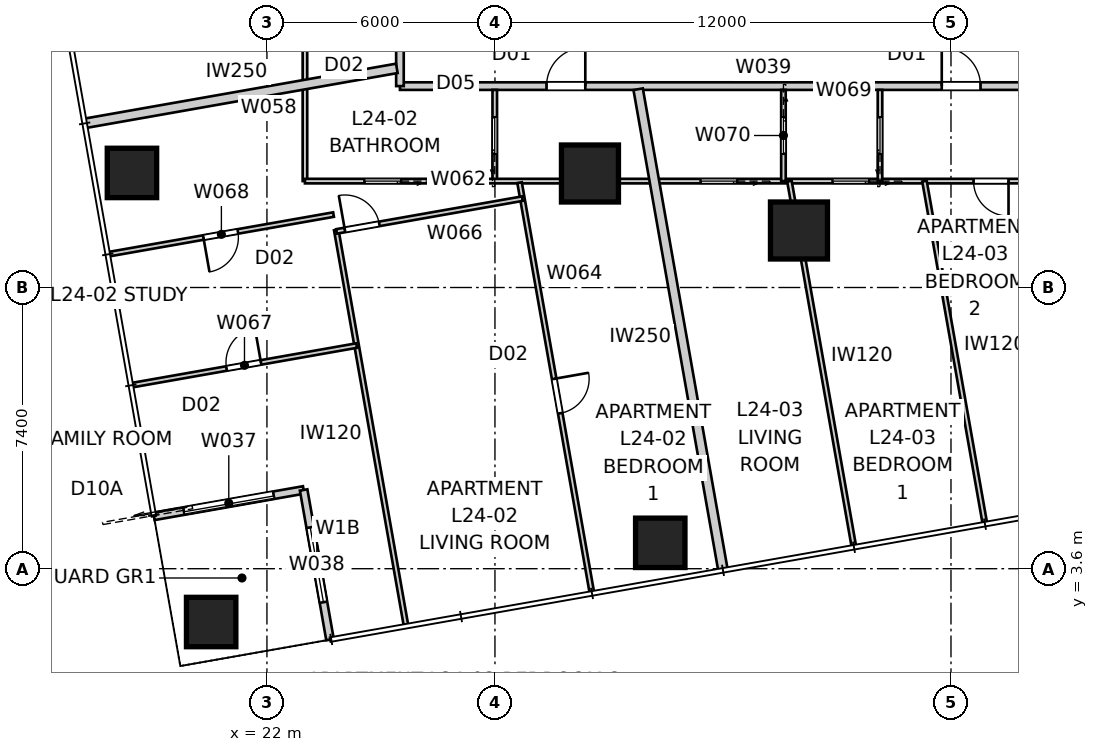
"""IFC4 building model, lengths in metres.
Left out: names, types, materials, properties, quantities, classifications, styles, units other than length and angle.
Written with IfcOpenShell. Run it as: python <this file> out.ifc"""

import sys

from ifc_helpers import new_model, si_unit, direction, frame, frame_2d, origin, origin_2d, place, context, subcontext, project, spatial, rectangle, extrude, element, fill, save


model = new_model("IFC4")
c1 = context("Model", 3, precision=1e-05, world=origin(), true_north=direction((0.0, 1.0)))
c2 = subcontext(c1, "Body", "Model", "MODEL_VIEW")
j1 = project(units=[si_unit("LENGTHUNIT", "METRE"), si_unit("PLANEANGLEUNIT", "RADIAN")], contexts=[c1])
p1 = place(None, origin())
s1 = spatial("IfcSite", under=j1, at=p1, CompositionType="ELEMENT")
p2 = place(p1, origin())
s2 = spatial("IfcBuilding", under=s1, at=p2, CompositionType="ELEMENT")
p3 = place(p2, frame((0.0, 0.0, 89.6)))
s3 = spatial("IfcBuildingStorey", under=s2, at=p3, CompositionType="ELEMENT", Elevation=89.6)
for number, where, z_axis, x_axis in (
    (1, (20.532, 2.197, 0.0), (0.0, 0.0, 1.0), (1.0, 0.0, 0.0)),
    (2, (32.35, 4.281, 0.0), (0.0, 0.0, 1.0), (1.0, 0.0, 0.0)),
    (3, (18.448, 14.015, 0.0), (0.0, 0.0, 1.0), (1.0, 0.0, 0.0)),
):
    element("IfcColumn", number, at=place(p3, frame(where, z_axis=z_axis, x_axis=x_axis)), inside=s3, PredefinedType="COLUMN", context=c2, shape_type="SweptSolid", body=[
        extrude(rectangle(XDim=1.3, YDim=1.3, at=origin_2d()), origin(), (0.0, 0.0, 1.0), 3.4),
    ])
for number, where, z_axis, x_axis in (
    (4, (30.5, 14.0, 0.0), (0.0, 0.0, 1.0), (1.0, 0.0, 0.0)),
    (5, (36.0, 12.5, 0.0), (0.0, 0.0, 1.0), (1.0, 0.0, 0.0)),
):
    element("IfcColumn", number, at=place(p3, frame(where, z_axis=z_axis, x_axis=x_axis)), inside=s3, PredefinedType="COLUMN", context=c2, shape_type="SweptSolid", body=[
        extrude(rectangle(XDim=1.5, YDim=1.5, at=origin_2d()), origin(), (0.0, 0.0, 1.0), 3.4),
    ])
p4 = place(p3, frame((19.026, 4.978, 0.0), z_axis=(0.0, 0.0, 1.0), x_axis=(0.984808127031, 0.173646056486, 0.0)))
e6 = element("IfcWall", 6, at=p4, inside=s3, PredefinedType="SOLIDWALL", context=c2, shape_type="SweptSolid", body=[
    extrude(rectangle(XDim=4.0, YDim=0.2, at=frame_2d((2.0, 0.0))), origin(), (0.0, 0.0, 1.0), 3.25),
])
p5 = place(p4, frame((0.8, 0.0, 0.0)))
e7 = element("IfcOpeningElement", 7, at=p5, cuts=e6, PredefinedType="OPENING", context=c2, shape_type="SweptSolid", body=[
    extrude(rectangle(XDim=2.4, YDim=2.1, at=frame_2d((1.2, 1.05))), frame((0.0, 0.11, 0.0), z_axis=(0.0, -1.0, 0.0), x_axis=(1.0, 0.0, 0.0)), (0.0, 0.0, 1.0), 0.22),
])
p6 = place(p3, frame((22.966, 5.672, 0.0), z_axis=(0.0, 0.0, 1.0), x_axis=(0.173646056486, -0.984808127031, 0.0)))
e8 = element("IfcWall", 8, at=p6, inside=s3, PredefinedType="SOLIDWALL", context=c2, shape_type="SweptSolid", body=[
    extrude(rectangle(XDim=4.0, YDim=0.2, at=frame_2d((2.0, 0.0))), origin(), (0.0, 0.0, 1.0), 3.25),
])
p7 = place(p6, frame((1.0, 0.0, 0.45)))
e9 = element("IfcOpeningElement", 9, at=p7, cuts=e8, PredefinedType="OPENING", context=c2, shape_type="SweptSolid", body=[
    extrude(rectangle(XDim=2.0, YDim=1.8, at=frame_2d((1.0, 0.9))), frame((0.0, 0.11, 0.0), z_axis=(0.0, -1.0, 0.0), x_axis=(1.0, 0.0, 0.0)), (0.0, 0.0, 1.0), 0.22),
])
p8 = place(p3, frame((25.5, 16.3, 0.0), z_axis=(0.0, 0.0, 1.0), x_axis=(1.0, 0.0, 0.0)))
e10 = element("IfcWall", 10, at=p8, inside=s3, PredefinedType="PARTITIONING", context=c2, shape_type="SweptSolid", body=[
    extrude(rectangle(XDim=29.0, YDim=0.2, at=frame_2d((14.5, 0.0))), origin(), (0.0, 0.0, 1.0), 3.25),
])
p9 = place(p8, frame((20.896, 0.0, 0.0)))
e11 = element("IfcOpeningElement", 11, at=p9, cuts=e10, PredefinedType="OPENING", context=c2, shape_type="SweptSolid", body=[
    extrude(rectangle(XDim=1.02, YDim=2.34, at=frame_2d((0.51, 1.17))), frame((0.0, 0.11, 0.0), z_axis=(0.0, -1.0, 0.0), x_axis=(1.0, 0.0, 0.0)), (0.0, 0.0, 1.0), 0.22),
])
p10 = place(p8, frame((14.257, 0.0, 0.0)))
e12 = element("IfcOpeningElement", 12, at=p10, cuts=e10, PredefinedType="OPENING", context=c2, shape_type="SweptSolid", body=[
    extrude(rectangle(XDim=1.02, YDim=2.34, at=frame_2d((0.51, 1.17))), frame((0.0, 0.11, 0.0), z_axis=(0.0, -1.0, 0.0), x_axis=(1.0, 0.0, 0.0)), (0.0, 0.0, 1.0), 0.22),
])
p11 = place(p8, frame((3.857, 0.0, 0.0)))
e13 = element("IfcOpeningElement", 13, at=p11, cuts=e10, PredefinedType="OPENING", context=c2, shape_type="SweptSolid", body=[
    extrude(rectangle(XDim=1.02, YDim=2.34, at=frame_2d((0.51, 1.17))), frame((0.0, 0.11, 0.0), z_axis=(0.0, -1.0, 0.0), x_axis=(1.0, 0.0, 0.0)), (0.0, 0.0, 1.0), 0.22),
])
p12 = place(p3, frame((25.5, 43.7, 0.0), z_axis=(0.0, 0.0, 1.0), x_axis=(0.0, -1.0, 0.0)))
e14 = element("IfcWall", 14, at=p12, inside=s3, PredefinedType="PARTITIONING", context=c2, shape_type="SweptSolid", body=[
    extrude(rectangle(XDim=27.4, YDim=0.2, at=frame_2d((13.7, 0.0))), origin(), (0.0, 0.0, 1.0), 3.25),
])
p13 = place(p12, frame((24.333, 0.0, 0.0)))
e15 = element("IfcOpeningElement", 15, at=p13, cuts=e14, PredefinedType="OPENING", context=c2, shape_type="SweptSolid", body=[
    extrude(rectangle(XDim=1.02, YDim=2.1, at=frame_2d((0.51, 1.05))), frame((0.0, 0.11, 0.0), z_axis=(0.0, -1.0, 0.0), x_axis=(1.0, 0.0, 0.0)), (0.0, 0.0, 1.0), 0.22),
])
p14 = place(p12, frame((10.631, 0.0, 0.0)))
e16 = element("IfcOpeningElement", 16, at=p14, cuts=e14, PredefinedType="OPENING", context=c2, shape_type="SweptSolid", body=[
    extrude(rectangle(XDim=1.02, YDim=2.34, at=frame_2d((0.51, 1.17))), frame((0.0, 0.11, 0.0), z_axis=(0.0, -1.0, 0.0), x_axis=(1.0, 0.0, 0.0)), (0.0, 0.0, 1.0), 0.22),
])
p15 = place(p12, frame((0.911, 0.0, 0.0)))
e17 = element("IfcOpeningElement", 17, at=p15, cuts=e14, PredefinedType="OPENING", context=c2, shape_type="SweptSolid", body=[
    extrude(rectangle(XDim=1.02, YDim=2.34, at=frame_2d((0.51, 1.17))), frame((0.0, 0.11, 0.0), z_axis=(0.0, -1.0, 0.0), x_axis=(1.0, 0.0, 0.0)), (0.0, 0.0, 1.0), 0.22),
])
p16 = place(p3, frame((34.001, 3.556, 0.0), z_axis=(0.0, 0.0, 1.0), x_axis=(-0.173639088111, 0.984809355703, 0.0)))
e18 = element("IfcWall", 18, at=p16, inside=s3, PredefinedType="PARTITIONING", context=c2, shape_type="SweptSolid", body=[
    extrude(rectangle(XDim=12.857, YDim=0.25, at=frame_2d((6.428, 0.0))), origin(), (0.0, 0.0, 1.0), 3.25),
])
p17 = place(p3, frame((17.203, 15.318, 0.0), z_axis=(0.0, 0.0, 1.0), x_axis=(0.984807121942, 0.173651756605, 0.0)))
e19 = element("IfcWall", 19, at=p17, inside=s3, PredefinedType="PARTITIONING", context=c2, shape_type="SweptSolid", body=[
    extrude(rectangle(XDim=8.341, YDim=0.25, at=frame_2d((4.171, 0.0))), origin(), (0.0, 0.0, 1.0), 3.25),
])
p18 = place(p3, frame((23.0, 13.8, 0.0), z_axis=(0.0, 0.0, 1.0), x_axis=(0.0, 1.0, 0.0)))
e20 = element("IfcWall", 20, at=p18, inside=s3, PredefinedType="PARTITIONING", context=c2, shape_type="SweptSolid", body=[
    extrude(rectangle(XDim=6.094, YDim=0.12, at=frame_2d((3.047, 0.0))), origin(), (0.0, 0.0, 1.0), 3.25),
])
p19 = place(p18, frame((3.857, 0.0, 0.0)))
e21 = element("IfcOpeningElement", 21, at=p19, cuts=e20, PredefinedType="OPENING", context=c2, shape_type="SweptSolid", body=[
    extrude(rectangle(XDim=0.92, YDim=2.34, at=frame_2d((0.46, 1.17))), frame((0.0, 0.07, 0.0), z_axis=(0.0, -1.0, 0.0), x_axis=(1.0, 0.0, 0.0)), (0.0, 0.0, 1.0), 0.14),
])
p20 = place(p3, frame((27.995, 13.8, 0.0), z_axis=(0.0, 0.0, 1.0), x_axis=(0.0, 1.0, 0.0)))
e22 = element("IfcWall", 22, at=p20, inside=s3, PredefinedType="PARTITIONING", context=c2, shape_type="SweptSolid", body=[
    extrude(rectangle(XDim=2.4, YDim=0.12, at=frame_2d((1.2, 0.0))), origin(), (0.0, 0.0, 1.0), 3.25),
])
p21 = place(p20, frame((0.72, 0.0, 0.0)))
e23 = element("IfcOpeningElement", 23, at=p21, cuts=e22, PredefinedType="OPENING", context=c2, shape_type="SweptSolid", body=[
    extrude(rectangle(XDim=0.96, YDim=2.1, at=frame_2d((0.48, 1.05))), frame((0.0, 0.07, 0.0), z_axis=(0.0, -1.0, 0.0), x_axis=(1.0, 0.0, 0.0)), (0.0, 0.0, 1.0), 0.14),
])
p22 = place(p3, frame((57.0, 13.8, 0.0), z_axis=(0.0, 0.0, 1.0), x_axis=(-1.0, 0.0, 0.0)))
e24 = element("IfcWall", 24, at=p22, inside=s3, PredefinedType="PARTITIONING", context=c2, shape_type="SweptSolid", body=[
    extrude(rectangle(XDim=34.0, YDim=0.12, at=frame_2d((17.0, 0.0))), origin(), (0.0, 0.0, 1.0), 2.55),
])
p23 = place(p22, frame((8.768, 0.0, 0.0)))
e25 = element("IfcOpeningElement", 25, at=p23, cuts=e24, PredefinedType="OPENING", context=c2, shape_type="SweptSolid", body=[
    extrude(rectangle(XDim=0.92, YDim=2.34, at=frame_2d((0.46, 1.17))), frame((0.0, 0.07, 0.0), z_axis=(0.0, -1.0, 0.0), x_axis=(1.0, 0.0, 0.0)), (0.0, 0.0, 1.0), 0.14),
])
p24 = place(p22, frame((10.995, 0.0, 0.0)))
e26 = element("IfcOpeningElement", 26, at=p24, cuts=e24, PredefinedType="OPENING", context=c2, shape_type="SweptSolid", body=[
    extrude(rectangle(XDim=0.92, YDim=2.34, at=frame_2d((0.46, 1.17))), frame((0.0, 0.07, 0.0), z_axis=(0.0, -1.0, 0.0), x_axis=(1.0, 0.0, 0.0)), (0.0, 0.0, 1.0), 0.14),
])
p25 = place(p22, frame((15.486, 0.0, 0.0)))
e27 = element("IfcOpeningElement", 27, at=p25, cuts=e24, PredefinedType="OPENING", context=c2, shape_type="SweptSolid", body=[
    extrude(rectangle(XDim=0.92, YDim=2.34, at=frame_2d((0.46, 1.17))), frame((0.0, 0.07, 0.0), z_axis=(0.0, -1.0, 0.0), x_axis=(1.0, 0.0, 0.0)), (0.0, 0.0, 1.0), 0.14),
])
p26 = place(p22, frame((4.804, 0.0, 0.0)))
e28 = element("IfcOpeningElement", 28, at=p26, cuts=e24, PredefinedType="OPENING", context=c2, shape_type="SweptSolid", body=[
    extrude(rectangle(XDim=0.96, YDim=2.1, at=frame_2d((0.48, 1.05))), frame((0.0, 0.07, 0.0), z_axis=(0.0, -1.0, 0.0), x_axis=(1.0, 0.0, 0.0)), (0.0, 0.0, 1.0), 0.14),
])
p27 = place(p22, frame((19.155, 0.0, 0.0)))
e29 = element("IfcOpeningElement", 29, at=p27, cuts=e24, PredefinedType="OPENING", context=c2, shape_type="SweptSolid", body=[
    extrude(rectangle(XDim=0.96, YDim=2.1, at=frame_2d((0.48, 1.05))), frame((0.0, 0.07, 0.0), z_axis=(0.0, -1.0, 0.0), x_axis=(1.0, 0.0, 0.0)), (0.0, 0.0, 1.0), 0.14),
])
p28 = place(p22, frame((31.473, 0.0, 0.0)))
e30 = element("IfcOpeningElement", 30, at=p28, cuts=e24, PredefinedType="OPENING", context=c2, shape_type="SweptSolid", body=[
    extrude(rectangle(XDim=0.96, YDim=2.1, at=frame_2d((0.48, 1.05))), frame((0.0, 0.07, 0.0), z_axis=(0.0, -1.0, 0.0), x_axis=(1.0, 0.0, 0.0)), (0.0, 0.0, 1.0), 0.14),
])
p29 = place(p22, frame((1.261, 0.0, 0.0)))
e31 = element("IfcOpeningElement", 31, at=p29, cuts=e24, PredefinedType="OPENING", context=c2, shape_type="SweptSolid", body=[
    extrude(rectangle(XDim=0.96, YDim=2.1, at=frame_2d((0.48, 1.05))), frame((0.0, 0.07, 0.0), z_axis=(0.0, -1.0, 0.0), x_axis=(1.0, 0.0, 0.0)), (0.0, 0.0, 1.0), 0.14),
])
p30 = place(p22, frame((22.627, 0.0, 0.0)))
e32 = element("IfcOpeningElement", 32, at=p30, cuts=e24, PredefinedType="OPENING", context=c2, shape_type="SweptSolid", body=[
    extrude(rectangle(XDim=0.96, YDim=2.1, at=frame_2d((0.48, 1.05))), frame((0.0, 0.07, 0.0), z_axis=(0.0, -1.0, 0.0), x_axis=(1.0, 0.0, 0.0)), (0.0, 0.0, 1.0), 0.14),
])
p31 = place(p3, frame((28.648, 13.76, 0.0), z_axis=(0.0, 0.0, 1.0), x_axis=(0.173632532564, -0.984810511538, 0.0)))
e33 = element("IfcWall", 33, at=p31, inside=s3, PredefinedType="PARTITIONING", context=c2, shape_type="SweptSolid", body=[
    extrude(rectangle(XDim=10.938, YDim=0.12, at=frame_2d((5.469, 0.0))), origin(), (0.0, 0.0, 1.0), 2.638),
])
p32 = place(p31, frame((5.243, 0.0, 0.0)))
e34 = element("IfcOpeningElement", 34, at=p32, cuts=e33, PredefinedType="OPENING", context=c2, shape_type="SweptSolid", body=[
    extrude(rectangle(XDim=0.92, YDim=2.34, at=frame_2d((0.46, 1.17))), frame((0.0, 0.07, 0.0), z_axis=(0.0, -1.0, 0.0), x_axis=(1.0, 0.0, 0.0)), (0.0, 0.0, 1.0), 0.14),
])
p33 = place(p3, frame((25.656, 2.126, 0.0), z_axis=(0.0, 0.0, 1.0), x_axis=(-0.173653317458, 0.984806846715, 0.0)))
e35 = element("IfcWall", 35, at=p33, inside=s3, PredefinedType="PARTITIONING", context=c2, shape_type="SweptSolid", body=[
    extrude(rectangle(XDim=10.55, YDim=0.12, at=frame_2d((5.275, 0.0))), origin(), (0.0, 0.0, 1.0), 3.25),
])
p34 = place(p3, frame((23.831, 12.476, 0.0), z_axis=(0.0, 0.0, 1.0), x_axis=(0.984810765884, 0.173631089957, 0.0)))
e36 = element("IfcWall", 36, at=p34, inside=s3, PredefinedType="PARTITIONING", context=c2, shape_type="SweptSolid", body=[
    extrude(rectangle(XDim=4.966, YDim=0.12, at=frame_2d((2.483, 0.0))), origin(), (0.0, 0.0, 1.0), 3.25),
])
p35 = place(p34, frame((0.223, 0.0, 0.0)))
e37 = element("IfcOpeningElement", 37, at=p35, cuts=e36, PredefinedType="OPENING", context=c2, shape_type="SweptSolid", body=[
    extrude(rectangle(XDim=0.92, YDim=2.34, at=frame_2d((0.46, 1.17))), frame((0.0, 0.07, 0.0), z_axis=(0.0, -1.0, 0.0), x_axis=(1.0, 0.0, 0.0)), (0.0, 0.0, 1.0), 0.14),
])
p36 = place(p3, frame((18.458, 8.432, 0.0), z_axis=(0.0, 0.0, 1.0), x_axis=(0.984806924634, 0.173652875567, 0.0)))
e38 = element("IfcWall", 38, at=p36, inside=s3, PredefinedType="PARTITIONING", context=c2, shape_type="SweptSolid", body=[
    extrude(rectangle(XDim=5.993, YDim=0.12, at=frame_2d((2.997, 0.0))), origin(), (0.0, 0.0, 1.0), 3.25),
])
p37 = place(p36, frame((2.517, 0.0, 0.0)))
e39 = element("IfcOpeningElement", 39, at=p37, cuts=e38, PredefinedType="OPENING", context=c2, shape_type="SweptSolid", body=[
    extrude(rectangle(XDim=0.92, YDim=2.34, at=frame_2d((0.46, 1.17))), frame((0.0, 0.07, 0.0), z_axis=(0.0, -1.0, 0.0), x_axis=(1.0, 0.0, 0.0)), (0.0, 0.0, 1.0), 0.14),
])
p38 = place(p3, frame((23.753, 12.919, 0.0), z_axis=(0.0, 0.0, 1.0), x_axis=(-0.984806924634, -0.173652875567, 0.0)))
e40 = element("IfcWall", 40, at=p38, inside=s3, PredefinedType="PARTITIONING", context=c2, shape_type="SweptSolid", body=[
    extrude(rectangle(XDim=5.993, YDim=0.12, at=frame_2d((2.997, 0.0))), origin(), (0.0, 0.0, 1.0), 2.638),
])
p39 = place(p38, frame((2.557, 0.0, 0.0)))
e41 = element("IfcOpeningElement", 41, at=p39, cuts=e40, PredefinedType="OPENING", context=c2, shape_type="SweptSolid", body=[
    extrude(rectangle(XDim=0.92, YDim=2.34, at=frame_2d((0.46, 1.17))), frame((0.0, 0.07, 0.0), z_axis=(0.0, -1.0, 0.0), x_axis=(1.0, 0.0, 0.0)), (0.0, 0.0, 1.0), 0.14),
])
p40 = place(p3, frame((38.132, 13.8, 0.0), z_axis=(0.0, 0.0, 1.0), x_axis=(0.0, 1.0, 0.0)))
e42 = element("IfcWall", 42, at=p40, inside=s3, PredefinedType="PARTITIONING", context=c2, shape_type="SweptSolid", body=[
    extrude(rectangle(XDim=2.4, YDim=0.12, at=frame_2d((1.2, 0.0))), origin(), (0.0, 0.0, 1.0), 3.25),
])
p41 = place(p40, frame((0.72, 0.0, 0.0)))
e43 = element("IfcOpeningElement", 43, at=p41, cuts=e42, PredefinedType="OPENING", context=c2, shape_type="SweptSolid", body=[
    extrude(rectangle(XDim=0.96, YDim=2.1, at=frame_2d((0.48, 1.05))), frame((0.0, 0.07, 0.0), z_axis=(0.0, -1.0, 0.0), x_axis=(1.0, 0.0, 0.0)), (0.0, 0.0, 1.0), 0.14),
])
p42 = place(p3, frame((35.591, 16.2, 0.0), z_axis=(0.0, 0.0, 1.0), x_axis=(0.0, -1.0, 0.0)))
e44 = element("IfcWall", 44, at=p42, inside=s3, PredefinedType="PARTITIONING", context=c2, shape_type="SweptSolid", body=[
    extrude(rectangle(XDim=2.4, YDim=0.12, at=frame_2d((1.2, 0.0))), origin(), (0.0, 0.0, 1.0), 3.25),
])
p43 = place(p42, frame((0.72, 0.0, 0.0)))
e45 = element("IfcOpeningElement", 45, at=p43, cuts=e44, PredefinedType="OPENING", context=c2, shape_type="SweptSolid", body=[
    extrude(rectangle(XDim=0.96, YDim=2.1, at=frame_2d((0.48, 1.05))), frame((0.0, 0.07, 0.0), z_axis=(0.0, -1.0, 0.0), x_axis=(1.0, 0.0, 0.0)), (0.0, 0.0, 1.0), 0.14),
])
p44 = place(p3, frame((35.749, 13.8, 0.0), z_axis=(0.0, 0.0, 1.0), x_axis=(0.173650980998, -0.984807258705, 0.0)))
e46 = element("IfcWall", 46, at=p44, inside=s3, PredefinedType="PARTITIONING", context=c2, shape_type="SweptSolid", body=[
    extrude(rectangle(XDim=9.744, YDim=0.12, at=frame_2d((4.872, 0.0))), origin(), (0.0, 0.0, 1.0), 3.25),
])
p45 = place(p3, frame((39.302, 13.8, 0.0), z_axis=(0.0, 0.0, 1.0), x_axis=(0.173652576186, -0.984806977424, 0.0)))
e47 = element("IfcWall", 47, at=p45, inside=s3, PredefinedType="PARTITIONING", context=c2, shape_type="SweptSolid", body=[
    extrude(rectangle(XDim=9.127, YDim=0.12, at=frame_2d((4.563, 0.0))), origin(), (0.0, 0.0, 1.0), 3.25),
])
p46 = place(p5, origin())
e48 = element("IfcDoor", 48, at=p46, inside=s3, OperationType="SLIDING_TO_LEFT", PredefinedType="DOOR", context=c2, shape_type="SweptSolid", body=[
    extrude(rectangle(XDim=2.4, YDim=2.1, at=frame_2d((1.2, 1.05))), frame((0.0, 0.025, 0.0), z_axis=(0.0, -1.0, 0.0), x_axis=(1.0, 0.0, 0.0)), (0.0, 0.0, 1.0), 0.05),
])
fill(e7, e48)
p47 = place(p7, origin())
e49 = element("IfcWindow", 49, at=p47, inside=s3, PartitioningType="SINGLE_PANEL", PredefinedType="WINDOW", context=c2, shape_type="SweptSolid", body=[
    extrude(rectangle(XDim=2.0, YDim=1.8, at=frame_2d((1.0, 0.9))), frame((0.0, 0.03, 0.0), z_axis=(0.0, -1.0, 0.0), x_axis=(1.0, 0.0, 0.0)), (0.0, 0.0, 1.0), 0.06),
])
fill(e9, e49)
p48 = place(p10, origin())
e50 = element("IfcDoor", 50, at=p48, inside=s3, OperationType="SINGLE_SWING_LEFT", PredefinedType="DOOR", context=c2, shape_type="SweptSolid", body=[
    extrude(rectangle(XDim=1.02, YDim=2.34, at=frame_2d((0.51, 1.17))), frame((0.0, 0.025, 0.0), z_axis=(0.0, -1.0, 0.0), x_axis=(1.0, 0.0, 0.0)), (0.0, 0.0, 1.0), 0.05),
])
fill(e12, e50)
p49 = place(p11, origin())
e51 = element("IfcDoor", 51, at=p49, inside=s3, OperationType="SINGLE_SWING_RIGHT", PredefinedType="DOOR", context=c2, shape_type="SweptSolid", body=[
    extrude(rectangle(XDim=1.02, YDim=2.34, at=frame_2d((0.51, 1.17))), frame((0.0, 0.025, 0.0), z_axis=(0.0, -1.0, 0.0), x_axis=(1.0, 0.0, 0.0)), (0.0, 0.0, 1.0), 0.05),
])
fill(e13, e51)
p50 = place(p25, origin())
e52 = element("IfcDoor", 52, at=p50, inside=s3, OperationType="SINGLE_SWING_LEFT", PredefinedType="DOOR", context=c2, shape_type="SweptSolid", body=[
    extrude(rectangle(XDim=0.92, YDim=2.34, at=frame_2d((0.46, 1.17))), frame((0.0, 0.025, 0.0), z_axis=(0.0, -1.0, 0.0), x_axis=(1.0, 0.0, 0.0)), (0.0, 0.0, 1.0), 0.05),
])
fill(e27, e52)
p51 = place(p41, origin())
e53 = element("IfcDoor", 53, at=p51, inside=s3, OperationType="SLIDING_TO_LEFT", PredefinedType="DOOR", context=c2, shape_type="SweptSolid", body=[
    extrude(rectangle(XDim=0.96, YDim=2.1, at=frame_2d((0.48, 1.05))), frame((0.0, 0.025, 0.0), z_axis=(0.0, -1.0, 0.0), x_axis=(1.0, 0.0, 0.0)), (0.0, 0.0, 1.0), 0.05),
])
fill(e43, e53)
p52 = place(p21, origin())
e54 = element("IfcDoor", 54, at=p52, inside=s3, OperationType="SLIDING_TO_LEFT", PredefinedType="DOOR", context=c2, shape_type="SweptSolid", body=[
    extrude(rectangle(XDim=0.96, YDim=2.1, at=frame_2d((0.48, 1.05))), frame((0.0, 0.025, 0.0), z_axis=(0.0, -1.0, 0.0), x_axis=(1.0, 0.0, 0.0)), (0.0, 0.0, 1.0), 0.05),
])
fill(e23, e54)
p53 = place(p27, origin())
e55 = element("IfcDoor", 55, at=p53, inside=s3, OperationType="SLIDING_TO_LEFT", PredefinedType="DOOR", context=c2, shape_type="SweptSolid", body=[
    extrude(rectangle(XDim=0.96, YDim=2.1, at=frame_2d((0.48, 1.05))), frame((0.0, 0.025, 0.0), z_axis=(0.0, -1.0, 0.0), x_axis=(1.0, 0.0, 0.0)), (0.0, 0.0, 1.0), 0.05),
])
fill(e29, e55)
p54 = place(p43, origin())
e56 = element("IfcDoor", 56, at=p54, inside=s3, OperationType="SLIDING_TO_LEFT", PredefinedType="DOOR", context=c2, shape_type="SweptSolid", body=[
    extrude(rectangle(XDim=0.96, YDim=2.1, at=frame_2d((0.48, 1.05))), frame((0.0, 0.025, 0.0), z_axis=(0.0, -1.0, 0.0), x_axis=(1.0, 0.0, 0.0)), (0.0, 0.0, 1.0), 0.05),
])
fill(e45, e56)
p55 = place(p28, origin())
e57 = element("IfcDoor", 57, at=p55, inside=s3, OperationType="SLIDING_TO_LEFT", PredefinedType="DOOR", context=c2, shape_type="SweptSolid", body=[
    extrude(rectangle(XDim=0.96, YDim=2.1, at=frame_2d((0.48, 1.05))), frame((0.0, 0.025, 0.0), z_axis=(0.0, -1.0, 0.0), x_axis=(1.0, 0.0, 0.0)), (0.0, 0.0, 1.0), 0.05),
])
fill(e30, e57)
p56 = place(p30, origin())
e58 = element("IfcDoor", 58, at=p56, inside=s3, OperationType="SLIDING_TO_LEFT", PredefinedType="DOOR", context=c2, shape_type="SweptSolid", body=[
    extrude(rectangle(XDim=0.96, YDim=2.1, at=frame_2d((0.48, 1.05))), frame((0.0, 0.025, 0.0), z_axis=(0.0, -1.0, 0.0), x_axis=(1.0, 0.0, 0.0)), (0.0, 0.0, 1.0), 0.05),
])
fill(e32, e58)
p57 = place(p39, origin())
e59 = element("IfcDoor", 59, at=p57, inside=s3, OperationType="SINGLE_SWING_RIGHT", PredefinedType="DOOR", context=c2, shape_type="SweptSolid", body=[
    extrude(rectangle(XDim=0.92, YDim=2.34, at=frame_2d((0.46, 1.17))), frame((0.0, 0.025, 0.0), z_axis=(0.0, -1.0, 0.0), x_axis=(1.0, 0.0, 0.0)), (0.0, 0.0, 1.0), 0.05),
])
fill(e41, e59)
p58 = place(p35, origin())
e60 = element("IfcDoor", 60, at=p58, inside=s3, OperationType="SINGLE_SWING_LEFT", PredefinedType="DOOR", context=c2, shape_type="SweptSolid", body=[
    extrude(rectangle(XDim=0.92, YDim=2.34, at=frame_2d((0.46, 1.17))), frame((0.0, 0.025, 0.0), z_axis=(0.0, -1.0, 0.0), x_axis=(1.0, 0.0, 0.0)), (0.0, 0.0, 1.0), 0.05),
])
fill(e37, e60)
p59 = place(p37, origin())
e61 = element("IfcDoor", 61, at=p59, inside=s3, OperationType="SINGLE_SWING_RIGHT", PredefinedType="DOOR", context=c2, shape_type="SweptSolid", body=[
    extrude(rectangle(XDim=0.92, YDim=2.34, at=frame_2d((0.46, 1.17))), frame((0.0, 0.025, 0.0), z_axis=(0.0, -1.0, 0.0), x_axis=(1.0, 0.0, 0.0)), (0.0, 0.0, 1.0), 0.05),
])
fill(e39, e61)
p60 = place(p32, origin())
e62 = element("IfcDoor", 62, at=p60, inside=s3, OperationType="SINGLE_SWING_LEFT", PredefinedType="DOOR", context=c2, shape_type="SweptSolid", body=[
    extrude(rectangle(XDim=0.92, YDim=2.34, at=frame_2d((0.46, 1.17))), frame((0.0, 0.025, 0.0), z_axis=(0.0, -1.0, 0.0), x_axis=(1.0, 0.0, 0.0)), (0.0, 0.0, 1.0), 0.05),
])
fill(e34, e62)
save(model, sys.argv[1])
